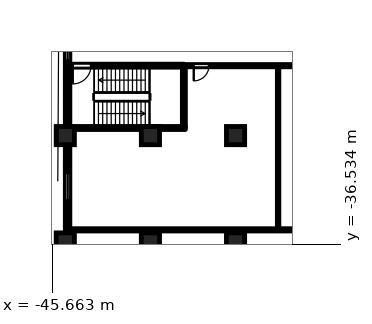
"""IFC4 building model, lengths in metres.
Left out: names, types, materials, properties, quantities, classifications, styles, units other than length and angle.
Written with IfcOpenShell. Run it as: python <this file> out.ifc"""

import sys

from ifc_helpers import new_model, si_unit, direction, frame, frame_2d, origin, origin_2d, place, context, subcontext, project, spatial, rectangle, circle, extrude, element, fill, save


model = new_model("IFC4")
c1 = context("Model", 3, precision=1e-05, world=origin(), true_north=direction((0.0, 1.0)))
c2 = subcontext(c1, "Body", "Model", "MODEL_VIEW")
j1 = project(units=[si_unit("LENGTHUNIT", "METRE"), si_unit("PLANEANGLEUNIT", "RADIAN")], contexts=[c1])
p1 = place(None, origin())
s1 = spatial("IfcSite", under=j1, at=p1, CompositionType="ELEMENT")
p2 = place(p1, origin())
s2 = spatial("IfcBuilding", under=s1, at=p2, CompositionType="ELEMENT")
p3 = place(p2, frame((0.0, 0.0, 11.3)))
s3 = spatial("IfcBuildingStorey", under=s2, at=p3, CompositionType="ELEMENT", Elevation=11.3)
for number, where, z_axis, x_axis in (
    (1, (-44.8, -29.4, 0.0), (0.0, 0.0, 1.0), (1.0, 0.0, 0.0)),
    (2, (-39.2, -29.4, 0.0), (0.0, 0.0, 1.0), (1.0, 0.0, 0.0)),
    (3, (-33.6, -29.4, 0.0), (0.0, 0.0, 1.0), (1.0, 0.0, 0.0)),
    (4, (-44.8, -36.4, 0.0), (0.0, 0.0, 1.0), (1.0, 0.0, 0.0)),
    (5, (-39.2, -36.4, 0.0), (0.0, 0.0, 1.0), (1.0, 0.0, 0.0)),
    (6, (-33.6, -36.4, 0.0), (0.0, 0.0, 1.0), (1.0, 0.0, 0.0)),
):
    element("IfcColumn", number, at=place(p3, frame(where, z_axis=z_axis, x_axis=x_axis)), inside=s3, PredefinedType="COLUMN", context=c2, shape_type="SweptSolid", body=[
        extrude(circle(Radius=0.6, at=origin_2d()), origin(), (0.0, 0.0, 1.0), 4.8),
    ])
p4 = place(p3, frame((-44.65, -23.0, 0.0), z_axis=(0.0, 0.0, 1.0), x_axis=(0.0, -1.0, 0.0)))
e7 = element("IfcWall", 7, at=p4, inside=s3, PredefinedType="SOLIDWALL", context=c2, shape_type="SweptSolid", body=[
    extrude(rectangle(XDim=5.8, YDim=0.3, at=frame_2d((2.9, 0.0))), origin(), (0.0, 0.0, 1.0), 3.65),
])
p5 = place(p4, frame((0.262, 0.0, 0.6)))
e8 = element("IfcOpeningElement", 8, at=p5, cuts=e7, PredefinedType="OPENING", context=c2, shape_type="SweptSolid", body=[
    extrude(rectangle(XDim=1.2, YDim=1.55, at=frame_2d((0.6, 0.775))), frame((0.0, 0.16, 0.0), z_axis=(0.0, -1.0, 0.0), x_axis=(1.0, 0.0, 0.0)), (0.0, 0.0, 1.0), 0.32),
])
p6 = place(p3, frame((-44.65, -30.0, 0.0), z_axis=(0.0, 0.0, 1.0), x_axis=(0.0, -1.0, 0.0)))
e9 = element("IfcWall", 9, at=p6, inside=s3, PredefinedType="SOLIDWALL", context=c2, shape_type="SweptSolid", body=[
    extrude(rectangle(XDim=5.8, YDim=0.3, at=frame_2d((2.9, 0.0))), origin(), (0.0, 0.0, 1.0), 3.65),
])
p7 = place(p6, frame((1.863, 0.0, 0.9)))
e10 = element("IfcOpeningElement", 10, at=p7, cuts=e9, PredefinedType="OPENING", context=c2, shape_type="SweptSolid", body=[
    extrude(rectangle(XDim=1.8, YDim=1.25, at=frame_2d((0.9, 0.625))), frame((0.0, 0.16, 0.0), z_axis=(0.0, -1.0, 0.0), x_axis=(1.0, 0.0, 0.0)), (0.0, 0.0, 1.0), 0.32),
])
p8 = place(p3, frame((-44.48, -35.6, 0.0), z_axis=(0.0, 0.0, 1.0), x_axis=(1.0, 0.0, 0.0)))
e11 = element("IfcWall", 11, at=p8, inside=s3, PredefinedType="PARTITIONING", context=c2, shape_type="SweptSolid", body=[
    extrude(rectangle(XDim=42.38, YDim=0.15, at=frame_2d((21.19, 0.0))), origin(), (0.0, 0.0, 1.0), 4.45),
])
p9 = place(p3, frame((-44.71, -28.9, 0.0), z_axis=(0.0, 0.0, 1.0), x_axis=(1.0, 0.0, 0.0)))
e12 = element("IfcWall", 12, at=p9, inside=s3, PredefinedType="SHEAR", context=c2, shape_type="SweptSolid", body=[
    extrude(rectangle(XDim=7.81, YDim=0.2, at=frame_2d((3.905, 0.0))), origin(), (0.0, 0.0, 1.0), 4.45),
])
p10 = place(p3, frame((-37.0, -24.8, 0.0), z_axis=(0.0, 0.0, 1.0), x_axis=(1.0, 0.0, 0.0)))
e13 = element("IfcWall", 13, at=p10, inside=s3, PredefinedType="PARTITIONING", context=c2, shape_type="SweptSolid", body=[
    extrude(rectangle(XDim=34.9, YDim=0.15, at=frame_2d((17.45, 0.0))), origin(), (0.0, 0.0, 1.0), 4.45),
])
p11 = place(p10, frame((0.65, 0.0, 0.0)))
e14 = element("IfcOpeningElement", 14, at=p11, cuts=e13, PredefinedType="OPENING", context=c2, shape_type="SweptSolid", body=[
    extrude(rectangle(XDim=1.0, YDim=2.1, at=frame_2d((0.5, 1.05))), frame((0.0, 0.085, 0.0), z_axis=(0.0, -1.0, 0.0), x_axis=(1.0, 0.0, 0.0)), (0.0, 0.0, 1.0), 0.17),
])
p12 = place(p10, frame((9.6, 0.0, 0.0)))
e15 = element("IfcOpeningElement", 15, at=p12, cuts=e13, PredefinedType="OPENING", context=c2, shape_type="SweptSolid", body=[
    extrude(rectangle(XDim=1.0, YDim=2.1, at=frame_2d((0.5, 1.05))), frame((0.0, 0.085, 0.0), z_axis=(0.0, -1.0, 0.0), x_axis=(1.0, 0.0, 0.0)), (0.0, 0.0, 1.0), 0.17),
])
p13 = place(p10, frame((11.85, 0.0, 0.0)))
e16 = element("IfcOpeningElement", 16, at=p13, cuts=e13, PredefinedType="OPENING", context=c2, shape_type="SweptSolid", body=[
    extrude(rectangle(XDim=1.0, YDim=2.1, at=frame_2d((0.5, 1.05))), frame((0.0, 0.085, 0.0), z_axis=(0.0, -1.0, 0.0), x_axis=(1.0, 0.0, 0.0)), (0.0, 0.0, 1.0), 0.17),
])
p14 = place(p10, frame((33.35, 0.0, 0.0)))
e17 = element("IfcOpeningElement", 17, at=p14, cuts=e13, PredefinedType="OPENING", context=c2, shape_type="SweptSolid", body=[
    extrude(rectangle(XDim=1.0, YDim=2.1, at=frame_2d((0.5, 1.05))), frame((0.0, 0.085, 0.0), z_axis=(0.0, -1.0, 0.0), x_axis=(1.0, 0.0, 0.0)), (0.0, 0.0, 1.0), 0.17),
])
p15 = place(p3, frame((-44.71, -24.8, 0.0), z_axis=(0.0, 0.0, 1.0), x_axis=(1.0, 0.0, 0.0)))
e18 = element("IfcWall", 18, at=p15, inside=s3, PredefinedType="SHEAR", context=c2, shape_type="SweptSolid", body=[
    extrude(rectangle(XDim=7.71, YDim=0.2, at=frame_2d((3.855, 0.0))), origin(), (0.0, 0.0, 1.0), 4.45),
])
p16 = place(p15, frame((0.4, 0.0, 0.0)))
e19 = element("IfcOpeningElement", 19, at=p16, cuts=e18, PredefinedType="OPENING", context=c2, shape_type="SweptSolid", body=[
    extrude(rectangle(XDim=1.2, YDim=2.1, at=frame_2d((0.6, 1.05))), frame((0.0, 0.11, 0.0), z_axis=(0.0, -1.0, 0.0), x_axis=(1.0, 0.0, 0.0)), (0.0, 0.0, 1.0), 0.22),
])
p17 = place(p3, frame((-37.0, -28.8, 0.0), z_axis=(0.0, 0.0, 1.0), x_axis=(0.0, 1.0, 0.0)))
e20 = element("IfcWall", 20, at=p17, inside=s3, PredefinedType="SHEAR", context=c2, shape_type="SweptSolid", body=[
    extrude(rectangle(XDim=3.925, YDim=0.2, at=frame_2d((1.962, 0.0))), origin(), (0.0, 0.0, 1.0), 4.45),
])
p18 = place(p3, frame((-30.8, -35.525, 0.0), z_axis=(0.0, 0.0, 1.0), x_axis=(0.0, 1.0, 0.0)))
e21 = element("IfcWall", 21, at=p18, inside=s3, PredefinedType="PARTITIONING", context=c2, shape_type="SweptSolid", body=[
    extrude(rectangle(XDim=10.65, YDim=0.1, at=frame_2d((5.325, 0.0))), origin(), (0.0, 0.0, 1.0), 4.45),
])
p19 = place(p16, origin())
e22 = element("IfcDoor", 22, at=p19, inside=s3, OperationType="SINGLE_SWING_LEFT", PredefinedType="DOOR", context=c2, shape_type="SweptSolid", body=[
    extrude(rectangle(XDim=1.2, YDim=2.1, at=frame_2d((0.6, 1.05))), frame((0.0, 0.025, 0.0), z_axis=(0.0, -1.0, 0.0), x_axis=(1.0, 0.0, 0.0)), (0.0, 0.0, 1.0), 0.05),
])
fill(e19, e22)
p20 = place(p11, origin())
e23 = element("IfcDoor", 23, at=p20, inside=s3, OperationType="SINGLE_SWING_LEFT", PredefinedType="DOOR", context=c2, shape_type="SweptSolid", body=[
    extrude(rectangle(XDim=1.0, YDim=2.1, at=frame_2d((0.5, 1.05))), frame((0.0, 0.025, 0.0), z_axis=(0.0, -1.0, 0.0), x_axis=(1.0, 0.0, 0.0)), (0.0, 0.0, 1.0), 0.05),
])
fill(e14, e23)
p21 = place(p5, origin())
e24 = element("IfcWindow", 24, at=p21, inside=s3, PartitioningType="SINGLE_PANEL", PredefinedType="WINDOW", context=c2, shape_type="SweptSolid", body=[
    extrude(rectangle(XDim=1.2, YDim=1.55, at=frame_2d((0.6, 0.775))), frame((0.0, 0.03, 0.0), z_axis=(0.0, -1.0, 0.0), x_axis=(1.0, 0.0, 0.0)), (0.0, 0.0, 1.0), 0.06),
])
fill(e8, e24)
p22 = place(p7, origin())
e25 = element("IfcWindow", 25, at=p22, inside=s3, PartitioningType="SINGLE_PANEL", PredefinedType="WINDOW", context=c2, shape_type="SweptSolid", body=[
    extrude(rectangle(XDim=1.8, YDim=1.25, at=frame_2d((0.9, 0.625))), frame((0.0, 0.03, 0.0), z_axis=(0.0, -1.0, 0.0), x_axis=(1.0, 0.0, 0.0)), (0.0, 0.0, 1.0), 0.06),
])
fill(e10, e25)
save(model, sys.argv[1])
